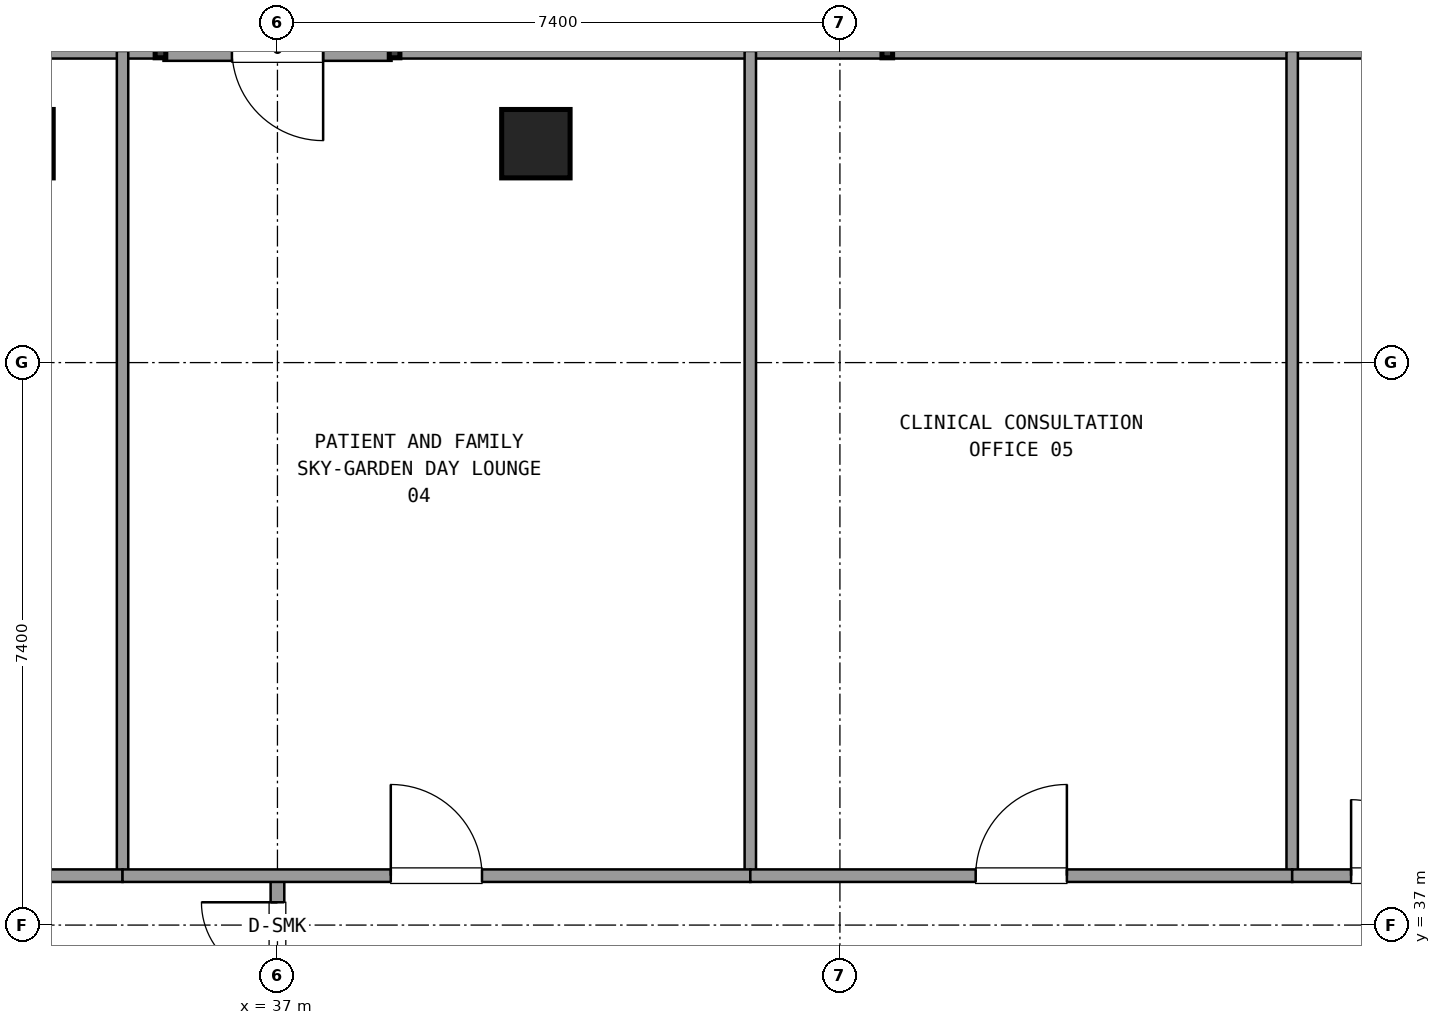
"""IFC4 building model, lengths in metres.
Left out: names, types, materials, properties, quantities, classifications, styles, units other than length and angle.
Written with IfcOpenShell. Run it as: python <this file> out.ifc"""

import sys

from ifc_helpers import new_model, si_unit, direction, frame, frame_2d, origin, origin_2d, place, context, subcontext, project, spatial, rectangle, extrude, element, fill, save


model = new_model("IFC4")
c1 = context("Model", 3, precision=1e-05, world=origin(), true_north=direction((0.0, 1.0)))
c2 = subcontext(c1, "Body", "Model", "MODEL_VIEW")
j1 = project(units=[si_unit("LENGTHUNIT", "METRE"), si_unit("PLANEANGLEUNIT", "RADIAN")], contexts=[c1])
p1 = place(None, origin())
s1 = spatial("IfcSite", under=j1, at=p1, CompositionType="ELEMENT")
p2 = place(p1, origin())
s2 = spatial("IfcBuilding", under=s1, at=p2, CompositionType="ELEMENT")
p3 = place(p2, frame((0.0, 0.0, 225.18)))
s3 = spatial("IfcBuildingStorey", under=s2, at=p3, CompositionType="ELEMENT", Elevation=225.18)
for number, where, z_axis, x_axis in (
    (1, (40.4, 47.28, 0.0), (0.0, 0.0, 1.0), (1.0, 0.0, 0.0)),
    (2, (33.6, 47.28, 0.0), (0.0, 0.0, 1.0), (1.0, 0.0, 0.0)),
):
    element("IfcColumn", number, at=place(p3, frame(where, z_axis=z_axis, x_axis=x_axis)), inside=s3, PredefinedType="COLUMN", context=c2, shape_type="SweptSolid", body=[
        extrude(rectangle(XDim=0.9, YDim=0.9, at=origin_2d()), origin(), (0.0, 0.0, 1.0), 3.6),
    ])
p4 = place(p3, frame((38.501, 48.52, 0.0), z_axis=(0.0, 0.0, 1.0), x_axis=(-1.0, 0.0, 0.0)))
e3 = element("IfcWall", 3, at=p4, inside=s3, PredefinedType="SOLIDWALL", context=c2, shape_type="SweptSolid", body=[
    extrude(rectangle(XDim=3.0, YDim=0.3, at=frame_2d((1.5, 0.0))), origin(), (0.0, 0.0, 1.0), 2.69),
])
p5 = place(p4, frame((0.9, 0.0, 0.0)))
e4 = element("IfcOpeningElement", 4, at=p5, cuts=e3, PredefinedType="OPENING", context=c2, shape_type="SweptSolid", body=[
    extrude(rectangle(XDim=1.2, YDim=2.2, at=frame_2d((0.6, 1.1))), frame((0.0, 0.16, 0.0), z_axis=(0.0, -1.0, 0.0), x_axis=(1.0, 0.0, 0.0)), (0.0, 0.0, 1.0), 0.32),
])
p6 = place(p3, frame((57.987, 48.52, 0.0), z_axis=(0.0, 0.0, 1.0), x_axis=(-1.0, 0.0, 0.0)))
e5 = element("IfcWall", 5, at=p6, inside=s3, PredefinedType="SOLIDWALL", context=c2, shape_type="SweptSolid", body=[
    extrude(rectangle(XDim=19.446, YDim=0.24, at=frame_2d((9.723, 0.0))), origin(), (0.0, 0.0, 1.0), 0.85),
])
p7 = place(p3, frame((35.461, 48.52, 0.0), z_axis=(0.0, 0.0, 1.0), x_axis=(-1.0, 0.0, 0.0)))
e6 = element("IfcWall", 6, at=p7, inside=s3, PredefinedType="SOLIDWALL", context=c2, shape_type="SweptSolid", body=[
    extrude(rectangle(XDim=19.448, YDim=0.24, at=frame_2d((9.724, 0.0))), origin(), (0.0, 0.0, 1.0), 0.85),
])
p8 = place(p3, frame((37.0, 34.95, 0.0), z_axis=(0.0, 0.0, 1.0), x_axis=(0.0, 1.0, 0.0)))
e7 = element("IfcWall", 7, at=p8, inside=s3, PredefinedType="PARTITIONING", context=c2, shape_type="SweptSolid", body=[
    extrude(rectangle(XDim=2.7, YDim=0.18, at=frame_2d((1.35, 0.0))), origin(), (0.0, 0.0, 1.0), 2.61),
])
p9 = place(p8, frame((0.35, 0.0, 0.0)))
e8 = element("IfcOpeningElement", 8, at=p9, cuts=e7, PredefinedType="OPENING", context=c2, shape_type="SweptSolid", body=[
    extrude(rectangle(XDim=2.0, YDim=2.2, at=frame_2d((1.0, 1.1))), frame((0.0, 0.1, 0.0), z_axis=(0.0, -1.0, 0.0), x_axis=(1.0, 0.0, 0.0)), (0.0, 0.0, 1.0), 0.2),
])
p10 = place(p3, frame((34.962, 37.65, 0.0), z_axis=(0.0, 0.0, 1.0), x_axis=(0.0, 1.0, 0.0)))
e9 = element("IfcWall", 9, at=p10, inside=s3, PredefinedType="PARTITIONING", context=c2, shape_type="SweptSolid", body=[
    extrude(rectangle(XDim=10.85, YDim=0.15, at=frame_2d((5.425, 0.0))), origin(), (0.0, 0.0, 1.0), 2.61),
])
p11 = place(p3, frame((29.223, 37.65, 0.0), z_axis=(0.0, 0.0, 1.0), x_axis=(1.0, 0.0, 0.0)))
e10 = element("IfcWall", 10, at=p11, inside=s3, PredefinedType="PARTITIONING", context=c2, shape_type="SweptSolid", body=[
    extrude(rectangle(XDim=5.739, YDim=0.165, at=frame_2d((2.87, 0.0))), origin(), (0.0, 0.0, 1.0), 2.61),
])
p12 = place(p11, frame((2.27, 0.0, 0.0)))
e11 = element("IfcOpeningElement", 11, at=p12, cuts=e10, PredefinedType="OPENING", context=c2, shape_type="SweptSolid", body=[
    extrude(rectangle(XDim=1.2, YDim=2.15, at=frame_2d((0.6, 1.075))), frame((0.0, 0.093, 0.0), z_axis=(0.0, -1.0, 0.0), x_axis=(1.0, 0.0, 0.0)), (0.0, 0.0, 1.0), 0.185),
])
p13 = place(p3, frame((43.221, 37.65, 0.0), z_axis=(0.0, 0.0, 1.0), x_axis=(0.0, 1.0, 0.0)))
e12 = element("IfcWall", 12, at=p13, inside=s3, PredefinedType="PARTITIONING", context=c2, shape_type="SweptSolid", body=[
    extrude(rectangle(XDim=10.85, YDim=0.15, at=frame_2d((5.425, 0.0))), origin(), (0.0, 0.0, 1.0), 2.61),
])
p14 = place(p3, frame((34.962, 37.65, 0.0), z_axis=(0.0, 0.0, 1.0), x_axis=(1.0, 0.0, 0.0)))
e13 = element("IfcWall", 13, at=p14, inside=s3, PredefinedType="PARTITIONING", context=c2, shape_type="SweptSolid", body=[
    extrude(rectangle(XDim=8.259, YDim=0.165, at=frame_2d((4.129, 0.0))), origin(), (0.0, 0.0, 1.0), 2.61),
])
p15 = place(p14, frame((3.529, 0.0, 0.0)))
e14 = element("IfcOpeningElement", 14, at=p15, cuts=e13, PredefinedType="OPENING", context=c2, shape_type="SweptSolid", body=[
    extrude(rectangle(XDim=1.2, YDim=2.15, at=frame_2d((0.6, 1.075))), frame((0.0, 0.093, 0.0), z_axis=(0.0, -1.0, 0.0), x_axis=(1.0, 0.0, 0.0)), (0.0, 0.0, 1.0), 0.185),
])
p16 = place(p3, frame((50.35, 37.65, 0.0), z_axis=(0.0, 0.0, 1.0), x_axis=(0.0, 1.0, 0.0)))
e15 = element("IfcWall", 15, at=p16, inside=s3, PredefinedType="PARTITIONING", context=c2, shape_type="SweptSolid", body=[
    extrude(rectangle(XDim=10.85, YDim=0.15, at=frame_2d((5.425, 0.0))), origin(), (0.0, 0.0, 1.0), 2.61),
])
p17 = place(p3, frame((43.221, 37.65, 0.0), z_axis=(0.0, 0.0, 1.0), x_axis=(1.0, 0.0, 0.0)))
e16 = element("IfcWall", 16, at=p17, inside=s3, PredefinedType="PARTITIONING", context=c2, shape_type="SweptSolid", body=[
    extrude(rectangle(XDim=7.129, YDim=0.165, at=frame_2d((3.564, 0.0))), origin(), (0.0, 0.0, 1.0), 2.61),
])
p18 = place(p17, frame((2.965, 0.0, 0.0)))
e17 = element("IfcOpeningElement", 17, at=p18, cuts=e16, PredefinedType="OPENING", context=c2, shape_type="SweptSolid", body=[
    extrude(rectangle(XDim=1.2, YDim=2.15, at=frame_2d((0.6, 1.075))), frame((0.0, 0.093, 0.0), z_axis=(0.0, -1.0, 0.0), x_axis=(1.0, 0.0, 0.0)), (0.0, 0.0, 1.0), 0.185),
])
p19 = place(p3, frame((50.35, 37.65, 0.0), z_axis=(0.0, 0.0, 1.0), x_axis=(1.0, 0.0, 0.0)))
e18 = element("IfcWall", 18, at=p19, inside=s3, PredefinedType="PARTITIONING", context=c2, shape_type="SweptSolid", body=[
    extrude(rectangle(XDim=2.55, YDim=0.165, at=frame_2d((1.275, 0.0))), origin(), (0.0, 0.0, 1.0), 2.61),
])
p20 = place(p19, frame((0.775, 0.0, 0.0)))
e19 = element("IfcOpeningElement", 19, at=p20, cuts=e18, PredefinedType="OPENING", context=c2, shape_type="SweptSolid", body=[
    extrude(rectangle(XDim=1.0, YDim=2.15, at=frame_2d((0.5, 1.075))), frame((0.0, 0.093, 0.0), z_axis=(0.0, -1.0, 0.0), x_axis=(1.0, 0.0, 0.0)), (0.0, 0.0, 1.0), 0.185),
])
p21 = place(p9, origin())
e20 = element("IfcDoor", 20, at=p21, inside=s3, OperationType="DOUBLE_DOOR_SINGLE_SWING", PredefinedType="DOOR", context=c2, shape_type="SweptSolid", body=[
    extrude(rectangle(XDim=2.0, YDim=2.2, at=frame_2d((1.0, 1.1))), frame((0.0, 0.025, 0.0), z_axis=(0.0, -1.0, 0.0), x_axis=(1.0, 0.0, 0.0)), (0.0, 0.0, 1.0), 0.05),
])
fill(e8, e20)
p22 = place(p15, origin())
e21 = element("IfcDoor", 21, at=p22, inside=s3, OperationType="SINGLE_SWING_LEFT", PredefinedType="DOOR", context=c2, shape_type="SweptSolid", body=[
    extrude(rectangle(XDim=1.2, YDim=2.15, at=frame_2d((0.6, 1.075))), frame((0.0, 0.025, 0.0), z_axis=(0.0, -1.0, 0.0), x_axis=(1.0, 0.0, 0.0)), (0.0, 0.0, 1.0), 0.05),
])
fill(e14, e21)
p23 = place(p18, origin())
e22 = element("IfcDoor", 22, at=p23, inside=s3, OperationType="SINGLE_SWING_RIGHT", PredefinedType="DOOR", context=c2, shape_type="SweptSolid", body=[
    extrude(rectangle(XDim=1.2, YDim=2.15, at=frame_2d((0.6, 1.075))), frame((0.0, 0.025, 0.0), z_axis=(0.0, -1.0, 0.0), x_axis=(1.0, 0.0, 0.0)), (0.0, 0.0, 1.0), 0.05),
])
fill(e17, e22)
p24 = place(p20, origin())
e23 = element("IfcDoor", 23, at=p24, inside=s3, OperationType="SINGLE_SWING_LEFT", PredefinedType="DOOR", context=c2, shape_type="SweptSolid", body=[
    extrude(rectangle(XDim=1.0, YDim=2.15, at=frame_2d((0.5, 1.075))), frame((0.0, 0.025, 0.0), z_axis=(0.0, -1.0, 0.0), x_axis=(1.0, 0.0, 0.0)), (0.0, 0.0, 1.0), 0.05),
])
fill(e19, e23)
save(model, sys.argv[1])
